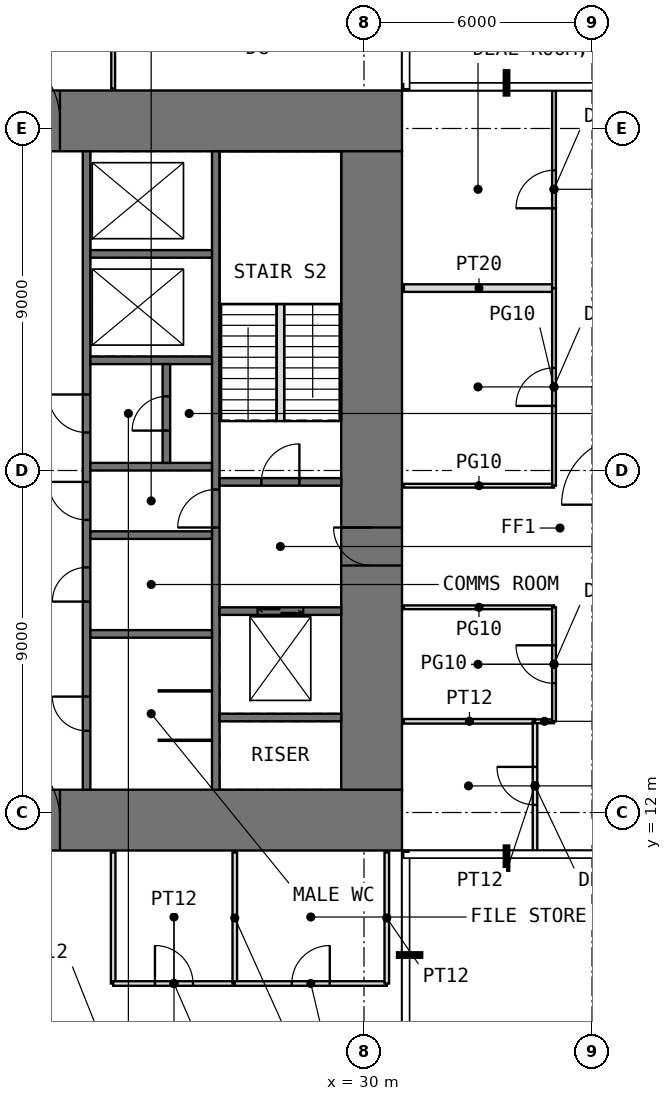
"""IFC4 building model, lengths in metres.
Left out: names, types, materials, properties, quantities, classifications, styles, units other than length and angle.
Written with IfcOpenShell. Run it as: python <this file> out.ifc"""

import sys

from ifc_helpers import new_model, si_unit, direction, frame, frame_2d, origin, place, context, subcontext, project, spatial, rectangle, extrude, element, fill, save


model = new_model("IFC4")
c1 = context("Model", 3, precision=1e-05, world=origin(), true_north=direction((0.0, 1.0)))
c2 = subcontext(c1, "Body", "Model", "MODEL_VIEW")
j1 = project(units=[si_unit("LENGTHUNIT", "METRE"), si_unit("PLANEANGLEUNIT", "RADIAN")], contexts=[c1])
p1 = place(None, origin())
s1 = spatial("IfcSite", under=j1, at=p1, CompositionType="ELEMENT")
p2 = place(p1, origin())
s2 = spatial("IfcBuilding", under=s1, at=p2, CompositionType="ELEMENT")
p3 = place(p2, frame((0.0, 0.0, 116.5)))
s3 = spatial("IfcBuildingStorey", under=s2, at=p3, CompositionType="ELEMENT", Elevation=116.5)
p4 = place(p3, frame((11.0, 11.8, -0.05), z_axis=(0.0, 0.0, 1.0), x_axis=(1.0, 0.0, 0.0)))
e1 = element("IfcWall", 1, at=p4, inside=s3, PredefinedType="SHEAR", context=c2, shape_type="SweptSolid", body=[
    extrude(rectangle(XDim=20.0, YDim=1.6, at=frame_2d((10.0, 0.0))), origin(), (0.0, 0.0, 1.0), 4.0),
])
p5 = place(p4, frame((9.0, 0.0, 0.05)))
e2 = element("IfcOpeningElement", 2, at=p5, cuts=e1, PredefinedType="OPENING", context=c2, shape_type="SweptSolid", body=[
    extrude(rectangle(XDim=2.0, YDim=2.2, at=frame_2d((1.0, 1.1))), frame((0.0, 0.81, 0.0), z_axis=(0.0, -1.0, 0.0), x_axis=(1.0, 0.0, 0.0)), (0.0, 0.0, 1.0), 1.62),
])
p6 = place(p3, frame((11.0, 30.2, -0.05), z_axis=(0.0, 0.0, 1.0), x_axis=(1.0, 0.0, 0.0)))
e3 = element("IfcWall", 3, at=p6, inside=s3, PredefinedType="SHEAR", context=c2, shape_type="SweptSolid", body=[
    extrude(rectangle(XDim=20.0, YDim=1.6, at=frame_2d((10.0, 0.0))), origin(), (0.0, 0.0, 1.0), 4.0),
])
p7 = place(p6, frame((9.0, 0.0, 0.05)))
e4 = element("IfcOpeningElement", 4, at=p7, cuts=e3, PredefinedType="OPENING", context=c2, shape_type="SweptSolid", body=[
    extrude(rectangle(XDim=2.0, YDim=2.2, at=frame_2d((1.0, 1.1))), frame((0.0, 0.81, 0.0), z_axis=(0.0, -1.0, 0.0), x_axis=(1.0, 0.0, 0.0)), (0.0, 0.0, 1.0), 1.62),
])
p8 = place(p3, frame((30.2, 12.6, -0.05), z_axis=(0.0, 0.0, 1.0), x_axis=(0.0, 1.0, 0.0)))
e5 = element("IfcWall", 5, at=p8, inside=s3, PredefinedType="SHEAR", context=c2, shape_type="SweptSolid", body=[
    extrude(rectangle(XDim=16.8, YDim=1.6, at=frame_2d((8.4, 0.0))), origin(), (0.0, 0.0, 1.0), 4.0),
])
p9 = place(p8, frame((5.9, 0.0, 0.05)))
e6 = element("IfcOpeningElement", 6, at=p9, cuts=e5, PredefinedType="OPENING", context=c2, shape_type="SweptSolid", body=[
    extrude(rectangle(XDim=1.0, YDim=2.2, at=frame_2d((0.5, 1.1))), frame((0.0, 0.81, 0.0), z_axis=(0.0, -1.0, 0.0), x_axis=(1.0, 0.0, 0.0)), (0.0, 0.0, 1.0), 1.62),
])
p10 = place(p3, frame((22.7, 12.6, -0.05), z_axis=(0.0, 0.0, 1.0), x_axis=(0.0, 1.0, 0.0)))
e7 = element("IfcWall", 7, at=p10, inside=s3, PredefinedType="SHEAR", context=c2, shape_type="SweptSolid", body=[
    extrude(rectangle(XDim=16.8, YDim=0.2, at=frame_2d((8.4, 0.0))), origin(), (0.0, 0.0, 1.0), 4.0),
])
p11 = place(p10, frame((7.1, 0.0, 0.05)))
e8 = element("IfcOpeningElement", 8, at=p11, cuts=e7, PredefinedType="OPENING", context=c2, shape_type="SweptSolid", body=[
    extrude(rectangle(XDim=1.0, YDim=2.2, at=frame_2d((0.5, 1.1))), frame((0.0, 0.11, 0.0), z_axis=(0.0, -1.0, 0.0), x_axis=(1.0, 0.0, 0.0)), (0.0, 0.0, 1.0), 0.22),
])
p12 = place(p10, frame((1.55, 0.0, 0.05)))
e9 = element("IfcOpeningElement", 9, at=p12, cuts=e7, PredefinedType="OPENING", context=c2, shape_type="SweptSolid", body=[
    extrude(rectangle(XDim=0.9, YDim=2.2, at=frame_2d((0.45, 1.1))), frame((0.0, 0.11, 0.0), z_axis=(0.0, -1.0, 0.0), x_axis=(1.0, 0.0, 0.0)), (0.0, 0.0, 1.0), 0.22),
])
p13 = place(p10, frame((4.95, 0.0, 0.05)))
e10 = element("IfcOpeningElement", 10, at=p13, cuts=e7, PredefinedType="OPENING", context=c2, shape_type="SweptSolid", body=[
    extrude(rectangle(XDim=0.9, YDim=2.2, at=frame_2d((0.45, 1.1))), frame((0.0, 0.11, 0.0), z_axis=(0.0, -1.0, 0.0), x_axis=(1.0, 0.0, 0.0)), (0.0, 0.0, 1.0), 0.22),
])
p14 = place(p10, frame((9.4, 0.0, 0.05)))
e11 = element("IfcOpeningElement", 11, at=p14, cuts=e7, PredefinedType="OPENING", context=c2, shape_type="SweptSolid", body=[
    extrude(rectangle(XDim=1.0, YDim=2.2, at=frame_2d((0.5, 1.1))), frame((0.0, 0.11, 0.0), z_axis=(0.0, -1.0, 0.0), x_axis=(1.0, 0.0, 0.0)), (0.0, 0.0, 1.0), 0.22),
])
p15 = place(p3, frame((26.1, 12.6, -0.05), z_axis=(0.0, 0.0, 1.0), x_axis=(0.0, 1.0, 0.0)))
e12 = element("IfcWall", 12, at=p15, inside=s3, PredefinedType="SHEAR", context=c2, shape_type="SweptSolid", body=[
    extrude(rectangle(XDim=16.8, YDim=0.2, at=frame_2d((8.4, 0.0))), origin(), (0.0, 0.0, 1.0), 4.0),
])
p16 = place(p15, frame((6.9, 0.0, 0.05)))
e13 = element("IfcOpeningElement", 13, at=p16, cuts=e12, PredefinedType="OPENING", context=c2, shape_type="SweptSolid", body=[
    extrude(rectangle(XDim=1.0, YDim=2.2, at=frame_2d((0.5, 1.1))), frame((0.0, 0.11, 0.0), z_axis=(0.0, -1.0, 0.0), x_axis=(1.0, 0.0, 0.0)), (0.0, 0.0, 1.0), 0.22),
])
for number, where, z_axis, x_axis in (
    (14, (22.8, 16.7, -0.05), (0.0, 0.0, 1.0), (1.0, 0.0, 0.0)),
    (15, (22.8, 19.3, -0.05), (0.0, 0.0, 1.0), (1.0, 0.0, 0.0)),
    (16, (22.8, 21.1, -0.05), (0.0, 0.0, 1.0), (1.0, 0.0, 0.0)),
    (17, (22.8, 23.9, -0.05), (0.0, 0.0, 1.0), (1.0, 0.0, 0.0)),
    (18, (22.8, 26.7, -0.05), (0.0, 0.0, 1.0), (1.0, 0.0, 0.0)),
    (19, (26.2, 14.5, -0.05), (0.0, 0.0, 1.0), (1.0, 0.0, 0.0)),
):
    element("IfcWall", number, at=place(p3, frame(where, z_axis=z_axis, x_axis=x_axis)), inside=s3, PredefinedType="SHEAR", context=c2, shape_type="SweptSolid", body=[
        extrude(rectangle(XDim=3.2, YDim=0.2, at=frame_2d((1.6, 0.0))), origin(), (0.0, 0.0, 1.0), 4.0),
    ])
p17 = place(p3, frame((26.2, 17.3, -0.05), z_axis=(0.0, 0.0, 1.0), x_axis=(1.0, 0.0, 0.0)))
e20 = element("IfcWall", 20, at=p17, inside=s3, PredefinedType="SHEAR", context=c2, shape_type="SweptSolid", body=[
    extrude(rectangle(XDim=3.2, YDim=0.2, at=frame_2d((1.6, 0.0))), origin(), (0.0, 0.0, 1.0), 4.0),
])
p18 = place(p17, frame((1.0, 0.0, 0.05)))
e21 = element("IfcOpeningElement", 21, at=p18, cuts=e20, PredefinedType="OPENING", context=c2, shape_type="SweptSolid", body=[
    extrude(rectangle(XDim=1.2, YDim=2.2, at=frame_2d((0.6, 1.1))), frame((0.0, 0.11, 0.0), z_axis=(0.0, -1.0, 0.0), x_axis=(1.0, 0.0, 0.0)), (0.0, 0.0, 1.0), 0.22),
])
p19 = place(p3, frame((26.2, 20.7, -0.05), z_axis=(0.0, 0.0, 1.0), x_axis=(1.0, 0.0, 0.0)))
e22 = element("IfcWall", 22, at=p19, inside=s3, PredefinedType="SHEAR", context=c2, shape_type="SweptSolid", body=[
    extrude(rectangle(XDim=3.2, YDim=0.2, at=frame_2d((1.6, 0.0))), origin(), (0.0, 0.0, 1.0), 4.0),
])
p20 = place(p19, frame((1.1, 0.0, 0.05)))
e23 = element("IfcOpeningElement", 23, at=p20, cuts=e22, PredefinedType="OPENING", context=c2, shape_type="SweptSolid", body=[
    extrude(rectangle(XDim=1.0, YDim=2.2, at=frame_2d((0.5, 1.1))), frame((0.0, 0.11, 0.0), z_axis=(0.0, -1.0, 0.0), x_axis=(1.0, 0.0, 0.0)), (0.0, 0.0, 1.0), 0.22),
])
for number, where, z_axis, x_axis in (
    (24, (24.6, 13.9, 0.0), (0.0, 0.0, 1.0), (1.0, 0.0, 0.0)),
    (25, (24.6, 15.2, 0.0), (0.0, 0.0, 1.0), (1.0, 0.0, 0.0)),
):
    element("IfcWall", number, at=place(p3, frame(where, z_axis=z_axis, x_axis=x_axis)), inside=s3, PredefinedType="PARTITIONING", context=c2, shape_type="SweptSolid", body=[
        extrude(rectangle(XDim=1.4, YDim=0.03, at=frame_2d((0.7, 0.0))), origin(), (0.0, 0.0, 1.0), 3.75),
    ])
p21 = place(p3, frame((24.8, 21.2, -0.05), z_axis=(0.0, 0.0, 1.0), x_axis=(0.0, 1.0, 0.0)))
e26 = element("IfcWall", 26, at=p21, inside=s3, PredefinedType="SHEAR", context=c2, shape_type="SweptSolid", body=[
    extrude(rectangle(XDim=2.6, YDim=0.2, at=frame_2d((1.3, 0.0))), origin(), (0.0, 0.0, 1.0), 4.0),
])
p22 = place(p21, frame((0.85, 0.0, 0.05)))
e27 = element("IfcOpeningElement", 27, at=p22, cuts=e26, PredefinedType="OPENING", context=c2, shape_type="SweptSolid", body=[
    extrude(rectangle(XDim=0.9, YDim=2.2, at=frame_2d((0.45, 1.1))), frame((0.0, 0.11, 0.0), z_axis=(0.0, -1.0, 0.0), x_axis=(1.0, 0.0, 0.0)), (0.0, 0.0, 1.0), 0.22),
])
p23 = place(p3, frame((23.4, 7.5, 0.0), z_axis=(0.0, 0.0, 1.0), x_axis=(0.0, 1.0, 0.0)))
e28 = element("IfcWall", 28, at=p23, inside=s3, PredefinedType="PARTITIONING", context=c2, shape_type="SweptSolid", body=[
    extrude(rectangle(XDim=3.45, YDim=0.12, at=frame_2d((1.725, 0.0))), origin(), (0.0, 0.0, 1.0), 3.75),
])
p24 = place(p3, frame((23.4, 7.5, 0.0), z_axis=(0.0, 0.0, 1.0), x_axis=(1.0, 0.0, 0.0)))
e29 = element("IfcWall", 29, at=p24, inside=s3, PredefinedType="PARTITIONING", context=c2, shape_type="SweptSolid", body=[
    extrude(rectangle(XDim=3.2, YDim=0.12, at=frame_2d((1.6, 0.0))), origin(), (0.0, 0.0, 1.0), 3.75),
])
p25 = place(p24, frame((1.1, 0.0, 0.0)))
e30 = element("IfcOpeningElement", 30, at=p25, cuts=e29, PredefinedType="OPENING", context=c2, shape_type="SweptSolid", body=[
    extrude(rectangle(XDim=1.0, YDim=2.2, at=frame_2d((0.5, 1.1))), frame((0.0, 0.07, 0.0), z_axis=(0.0, -1.0, 0.0), x_axis=(1.0, 0.0, 0.0)), (0.0, 0.0, 1.0), 0.14),
])
p26 = place(p3, frame((23.4, 31.05, 0.0), z_axis=(0.0, 0.0, 1.0), x_axis=(0.0, 1.0, 0.0)))
e31 = element("IfcWall", 31, at=p26, inside=s3, PredefinedType="PARTITIONING", context=c2, shape_type="SweptSolid", body=[
    extrude(rectangle(XDim=3.95, YDim=0.1, at=frame_2d((1.975, 0.0))), origin(), (0.0, 0.0, 1.0), 3.75),
])
p27 = place(p3, frame((26.6, 7.5, 0.0), z_axis=(0.0, 0.0, 1.0), x_axis=(0.0, 1.0, 0.0)))
e32 = element("IfcWall", 32, at=p27, inside=s3, PredefinedType="PARTITIONING", context=c2, shape_type="SweptSolid", body=[
    extrude(rectangle(XDim=3.45, YDim=0.12, at=frame_2d((1.725, 0.0))), origin(), (0.0, 0.0, 1.0), 3.75),
])
p28 = place(p3, frame((26.6, 7.5, 0.0), z_axis=(0.0, 0.0, 1.0), x_axis=(1.0, 0.0, 0.0)))
e33 = element("IfcWall", 33, at=p28, inside=s3, PredefinedType="PARTITIONING", context=c2, shape_type="SweptSolid", body=[
    extrude(rectangle(XDim=4.0, YDim=0.12, at=frame_2d((2.0, 0.0))), origin(), (0.0, 0.0, 1.0), 3.75),
])
p29 = place(p28, frame((1.5, 0.0, 0.0)))
e34 = element("IfcOpeningElement", 34, at=p29, cuts=e33, PredefinedType="OPENING", context=c2, shape_type="SweptSolid", body=[
    extrude(rectangle(XDim=1.0, YDim=2.2, at=frame_2d((0.5, 1.1))), frame((0.0, 0.07, 0.0), z_axis=(0.0, -1.0, 0.0), x_axis=(1.0, 0.0, 0.0)), (0.0, 0.0, 1.0), 0.14),
])
for number, where, z_axis, x_axis in (
    (35, (30.6, 7.5, 0.0), (0.0, 0.0, 1.0), (0.0, 1.0, 0.0)),
    (36, (31.05, 14.4, 0.0), (0.0, 0.0, 1.0), (1.0, 0.0, 0.0)),
):
    element("IfcWall", number, at=place(p3, frame(where, z_axis=z_axis, x_axis=x_axis)), inside=s3, PredefinedType="PARTITIONING", context=c2, shape_type="SweptSolid", body=[
        extrude(rectangle(XDim=3.45, YDim=0.12, at=frame_2d((1.725, 0.0))), origin(), (0.0, 0.0, 1.0), 3.75),
    ])
for number, where, z_axis, x_axis in (
    (37, (31.05, 17.4, 0.0), (0.0, 0.0, 1.0), (1.0, 0.0, 0.0)),
    (38, (31.05, 20.6, 0.0), (0.0, 0.0, 1.0), (1.0, 0.0, 0.0)),
):
    element("IfcWall", number, at=place(p3, frame(where, z_axis=z_axis, x_axis=x_axis)), inside=s3, PredefinedType="PARTITIONING", context=c2, shape_type="SweptSolid", body=[
        extrude(rectangle(XDim=3.95, YDim=0.1, at=frame_2d((1.975, 0.0))), origin(), (0.0, 0.0, 1.0), 3.75),
    ])
p30 = place(p3, frame((31.05, 25.8, 0.0), z_axis=(0.0, 0.0, 1.0), x_axis=(1.0, 0.0, 0.0)))
e39 = element("IfcWall", 39, at=p30, inside=s3, PredefinedType="PARTITIONING", context=c2, shape_type="SweptSolid", body=[
    extrude(rectangle(XDim=3.95, YDim=0.2, at=frame_2d((1.975, 0.0))), origin(), (0.0, 0.0, 1.0), 3.75),
])
p31 = place(p3, frame((34.5, 11.0, 0.0), z_axis=(0.0, 0.0, 1.0), x_axis=(0.0, 1.0, 0.0)))
e40 = element("IfcWall", 40, at=p31, inside=s3, PredefinedType="PARTITIONING", context=c2, shape_type="SweptSolid", body=[
    extrude(rectangle(XDim=3.4, YDim=0.12, at=frame_2d((1.7, 0.0))), origin(), (0.0, 0.0, 1.0), 3.75),
])
p32 = place(p31, frame((1.2, 0.0, 0.0)))
e41 = element("IfcOpeningElement", 41, at=p32, cuts=e40, PredefinedType="OPENING", context=c2, shape_type="SweptSolid", body=[
    extrude(rectangle(XDim=1.0, YDim=2.2, at=frame_2d((0.5, 1.1))), frame((0.0, 0.07, 0.0), z_axis=(0.0, -1.0, 0.0), x_axis=(1.0, 0.0, 0.0)), (0.0, 0.0, 1.0), 0.14),
])
p33 = place(p3, frame((34.5, 14.4, 0.0), z_axis=(0.0, 0.0, 1.0), x_axis=(1.0, 0.0, 0.0)))
e42 = element("IfcWall", 42, at=p33, inside=s3, PredefinedType="PARTITIONING", context=c2, shape_type="SweptSolid", body=[
    extrude(rectangle(XDim=0.5, YDim=0.1, at=frame_2d((0.25, 0.0))), origin(), (0.0, 0.0, 1.0), 3.75),
])
p34 = place(p3, frame((35.0, 14.4, 0.0), z_axis=(0.0, 0.0, 1.0), x_axis=(0.0, 1.0, 0.0)))
e43 = element("IfcWall", 43, at=p34, inside=s3, PredefinedType="PARTITIONING", context=c2, shape_type="SweptSolid", body=[
    extrude(rectangle(XDim=3.0, YDim=0.1, at=frame_2d((1.5, 0.0))), origin(), (0.0, 0.0, 1.0), 3.75),
])
p35 = place(p34, frame((1.0, 0.0, 0.0)))
e44 = element("IfcOpeningElement", 44, at=p35, cuts=e43, PredefinedType="OPENING", context=c2, shape_type="SweptSolid", body=[
    extrude(rectangle(XDim=1.0, YDim=2.4, at=frame_2d((0.5, 1.2))), frame((0.0, 0.06, 0.0), z_axis=(0.0, -1.0, 0.0), x_axis=(1.0, 0.0, 0.0)), (0.0, 0.0, 1.0), 0.12),
])
p36 = place(p3, frame((35.0, 20.6, 0.0), z_axis=(0.0, 0.0, 1.0), x_axis=(0.0, 1.0, 0.0)))
e45 = element("IfcWall", 45, at=p36, inside=s3, PredefinedType="PARTITIONING", context=c2, shape_type="SweptSolid", body=[
    extrude(rectangle(XDim=5.2, YDim=0.1, at=frame_2d((2.6, 0.0))), origin(), (0.0, 0.0, 1.0), 3.75),
])
p37 = place(p36, frame((2.1, 0.0, 0.0)))
e46 = element("IfcOpeningElement", 46, at=p37, cuts=e45, PredefinedType="OPENING", context=c2, shape_type="SweptSolid", body=[
    extrude(rectangle(XDim=1.0, YDim=2.4, at=frame_2d((0.5, 1.2))), frame((0.0, 0.06, 0.0), z_axis=(0.0, -1.0, 0.0), x_axis=(1.0, 0.0, 0.0)), (0.0, 0.0, 1.0), 0.12),
])
p38 = place(p3, frame((35.0, 25.8, 0.0), z_axis=(0.0, 0.0, 1.0), x_axis=(0.0, 1.0, 0.0)))
e47 = element("IfcWall", 47, at=p38, inside=s3, PredefinedType="PARTITIONING", context=c2, shape_type="SweptSolid", body=[
    extrude(rectangle(XDim=5.2, YDim=0.1, at=frame_2d((2.6, 0.0))), origin(), (0.0, 0.0, 1.0), 3.75),
])
p39 = place(p38, frame((2.1, 0.0, 0.0)))
e48 = element("IfcOpeningElement", 48, at=p39, cuts=e47, PredefinedType="OPENING", context=c2, shape_type="SweptSolid", body=[
    extrude(rectangle(XDim=1.0, YDim=2.4, at=frame_2d((0.5, 1.2))), frame((0.0, 0.06, 0.0), z_axis=(0.0, -1.0, 0.0), x_axis=(1.0, 0.0, 0.0)), (0.0, 0.0, 1.0), 0.12),
])
p40 = place(p3, frame((27.8, 22.3, 0.0), z_axis=(0.0, 0.0, 1.0), x_axis=(0.0, 1.0, 0.0)))
e49 = element("IfcWall", 49, at=p40, inside=s3, PredefinedType="PARTITIONING", context=c2, shape_type="SweptSolid", body=[
    extrude(rectangle(XDim=3.08, YDim=0.2, at=frame_2d((1.54, 0.0))), origin(), (0.0, 0.0, 1.0), 4.0),
])
p41 = place(p5, origin())
e50 = element("IfcDoor", 50, at=p41, inside=s3, OperationType="DOUBLE_DOOR_SINGLE_SWING", PredefinedType="DOOR", context=c2, shape_type="SweptSolid", body=[
    extrude(rectangle(XDim=2.0, YDim=2.2, at=frame_2d((1.0, 1.1))), frame((0.0, 0.025, 0.0), z_axis=(0.0, -1.0, 0.0), x_axis=(1.0, 0.0, 0.0)), (0.0, 0.0, 1.0), 0.05),
])
fill(e2, e50)
p42 = place(p7, origin())
e51 = element("IfcDoor", 51, at=p42, inside=s3, OperationType="DOUBLE_DOOR_SINGLE_SWING", PredefinedType="DOOR", context=c2, shape_type="SweptSolid", body=[
    extrude(rectangle(XDim=2.0, YDim=2.2, at=frame_2d((1.0, 1.1))), frame((0.0, 0.025, 0.0), z_axis=(0.0, -1.0, 0.0), x_axis=(1.0, 0.0, 0.0)), (0.0, 0.0, 1.0), 0.05),
])
fill(e4, e51)
p43 = place(p9, origin())
e52 = element("IfcDoor", 52, at=p43, inside=s3, OperationType="SINGLE_SWING_RIGHT", PredefinedType="DOOR", context=c2, shape_type="SweptSolid", body=[
    extrude(rectangle(XDim=1.0, YDim=2.2, at=frame_2d((0.5, 1.1))), frame((0.0, 0.025, 0.0), z_axis=(0.0, -1.0, 0.0), x_axis=(1.0, 0.0, 0.0)), (0.0, 0.0, 1.0), 0.05),
])
fill(e6, e52)
p44 = place(p20, origin())
e53 = element("IfcDoor", 53, at=p44, inside=s3, OperationType="SINGLE_SWING_RIGHT", PredefinedType="DOOR", context=c2, shape_type="SweptSolid", body=[
    extrude(rectangle(XDim=1.0, YDim=2.2, at=frame_2d((0.5, 1.1))), frame((0.0, 0.025, 0.0), z_axis=(0.0, -1.0, 0.0), x_axis=(1.0, 0.0, 0.0)), (0.0, 0.0, 1.0), 0.05),
])
fill(e23, e53)
p45 = place(p16, origin())
e54 = element("IfcDoor", 54, at=p45, inside=s3, OperationType="SINGLE_SWING_LEFT", PredefinedType="DOOR", context=c2, shape_type="SweptSolid", body=[
    extrude(rectangle(XDim=1.0, YDim=2.2, at=frame_2d((0.5, 1.1))), frame((0.0, 0.025, 0.0), z_axis=(0.0, -1.0, 0.0), x_axis=(1.0, 0.0, 0.0)), (0.0, 0.0, 1.0), 0.05),
])
fill(e13, e54)
p46 = place(p11, origin())
e55 = element("IfcDoor", 55, at=p46, inside=s3, OperationType="SINGLE_SWING_RIGHT", PredefinedType="DOOR", context=c2, shape_type="SweptSolid", body=[
    extrude(rectangle(XDim=1.0, YDim=2.2, at=frame_2d((0.5, 1.1))), frame((0.0, 0.025, 0.0), z_axis=(0.0, -1.0, 0.0), x_axis=(1.0, 0.0, 0.0)), (0.0, 0.0, 1.0), 0.05),
])
fill(e8, e55)
p47 = place(p12, origin())
e56 = element("IfcDoor", 56, at=p47, inside=s3, OperationType="SINGLE_SWING_RIGHT", PredefinedType="DOOR", context=c2, shape_type="SweptSolid", body=[
    extrude(rectangle(XDim=0.9, YDim=2.2, at=frame_2d((0.45, 1.1))), frame((0.0, 0.025, 0.0), z_axis=(0.0, -1.0, 0.0), x_axis=(1.0, 0.0, 0.0)), (0.0, 0.0, 1.0), 0.05),
])
fill(e9, e56)
p48 = place(p13, origin())
e57 = element("IfcDoor", 57, at=p48, inside=s3, OperationType="SINGLE_SWING_LEFT", PredefinedType="DOOR", context=c2, shape_type="SweptSolid", body=[
    extrude(rectangle(XDim=0.9, YDim=2.2, at=frame_2d((0.45, 1.1))), frame((0.0, 0.025, 0.0), z_axis=(0.0, -1.0, 0.0), x_axis=(1.0, 0.0, 0.0)), (0.0, 0.0, 1.0), 0.05),
])
fill(e10, e57)
p49 = place(p14, origin())
e58 = element("IfcDoor", 58, at=p49, inside=s3, OperationType="SINGLE_SWING_RIGHT", PredefinedType="DOOR", context=c2, shape_type="SweptSolid", body=[
    extrude(rectangle(XDim=1.0, YDim=2.2, at=frame_2d((0.5, 1.1))), frame((0.0, 0.025, 0.0), z_axis=(0.0, -1.0, 0.0), x_axis=(1.0, 0.0, 0.0)), (0.0, 0.0, 1.0), 0.05),
])
fill(e11, e58)
p50 = place(p22, origin())
e59 = element("IfcDoor", 59, at=p50, inside=s3, OperationType="SINGLE_SWING_LEFT", PredefinedType="DOOR", context=c2, shape_type="SweptSolid", body=[
    extrude(rectangle(XDim=0.9, YDim=2.2, at=frame_2d((0.45, 1.1))), frame((0.0, 0.025, 0.0), z_axis=(0.0, -1.0, 0.0), x_axis=(1.0, 0.0, 0.0)), (0.0, 0.0, 1.0), 0.05),
])
fill(e27, e59)
p51 = place(p25, origin())
e60 = element("IfcDoor", 60, at=p51, inside=s3, OperationType="SINGLE_SWING_LEFT", PredefinedType="DOOR", context=c2, shape_type="SweptSolid", body=[
    extrude(rectangle(XDim=1.0, YDim=2.2, at=frame_2d((0.5, 1.1))), frame((0.0, 0.025, 0.0), z_axis=(0.0, -1.0, 0.0), x_axis=(1.0, 0.0, 0.0)), (0.0, 0.0, 1.0), 0.05),
])
fill(e30, e60)
p52 = place(p29, origin())
e61 = element("IfcDoor", 61, at=p52, inside=s3, OperationType="SINGLE_SWING_RIGHT", PredefinedType="DOOR", context=c2, shape_type="SweptSolid", body=[
    extrude(rectangle(XDim=1.0, YDim=2.2, at=frame_2d((0.5, 1.1))), frame((0.0, 0.025, 0.0), z_axis=(0.0, -1.0, 0.0), x_axis=(1.0, 0.0, 0.0)), (0.0, 0.0, 1.0), 0.05),
])
fill(e34, e61)
p53 = place(p32, origin())
e62 = element("IfcDoor", 62, at=p53, inside=s3, OperationType="SINGLE_SWING_RIGHT", PredefinedType="DOOR", context=c2, shape_type="SweptSolid", body=[
    extrude(rectangle(XDim=1.0, YDim=2.2, at=frame_2d((0.5, 1.1))), frame((0.0, 0.025, 0.0), z_axis=(0.0, -1.0, 0.0), x_axis=(1.0, 0.0, 0.0)), (0.0, 0.0, 1.0), 0.05),
])
fill(e41, e62)
p54 = place(p35, origin())
e63 = element("IfcDoor", 63, at=p54, inside=s3, OperationType="SINGLE_SWING_RIGHT", PredefinedType="DOOR", context=c2, shape_type="SweptSolid", body=[
    extrude(rectangle(XDim=1.0, YDim=2.4, at=frame_2d((0.5, 1.2))), frame((0.0, 0.025, 0.0), z_axis=(0.0, -1.0, 0.0), x_axis=(1.0, 0.0, 0.0)), (0.0, 0.0, 1.0), 0.05),
])
fill(e44, e63)
p55 = place(p37, origin())
e64 = element("IfcDoor", 64, at=p55, inside=s3, OperationType="SINGLE_SWING_LEFT", PredefinedType="DOOR", context=c2, shape_type="SweptSolid", body=[
    extrude(rectangle(XDim=1.0, YDim=2.4, at=frame_2d((0.5, 1.2))), frame((0.0, 0.025, 0.0), z_axis=(0.0, -1.0, 0.0), x_axis=(1.0, 0.0, 0.0)), (0.0, 0.0, 1.0), 0.05),
])
fill(e46, e64)
p56 = place(p39, origin())
e65 = element("IfcDoor", 65, at=p56, inside=s3, OperationType="SINGLE_SWING_LEFT", PredefinedType="DOOR", context=c2, shape_type="SweptSolid", body=[
    extrude(rectangle(XDim=1.0, YDim=2.4, at=frame_2d((0.5, 1.2))), frame((0.0, 0.025, 0.0), z_axis=(0.0, -1.0, 0.0), x_axis=(1.0, 0.0, 0.0)), (0.0, 0.0, 1.0), 0.05),
])
fill(e48, e65)
p57 = place(p18, origin())
e66 = element("IfcDoor", 66, at=p57, inside=s3, OperationType="DOUBLE_DOOR_SLIDING", PredefinedType="DOOR", context=c2, shape_type="SweptSolid", body=[
    extrude(rectangle(XDim=1.2, YDim=2.2, at=frame_2d((0.6, 1.1))), frame((0.0, 0.025, 0.0), z_axis=(0.0, -1.0, 0.0), x_axis=(1.0, 0.0, 0.0)), (0.0, 0.0, 1.0), 0.05),
])
fill(e21, e66)
save(model, sys.argv[1])
